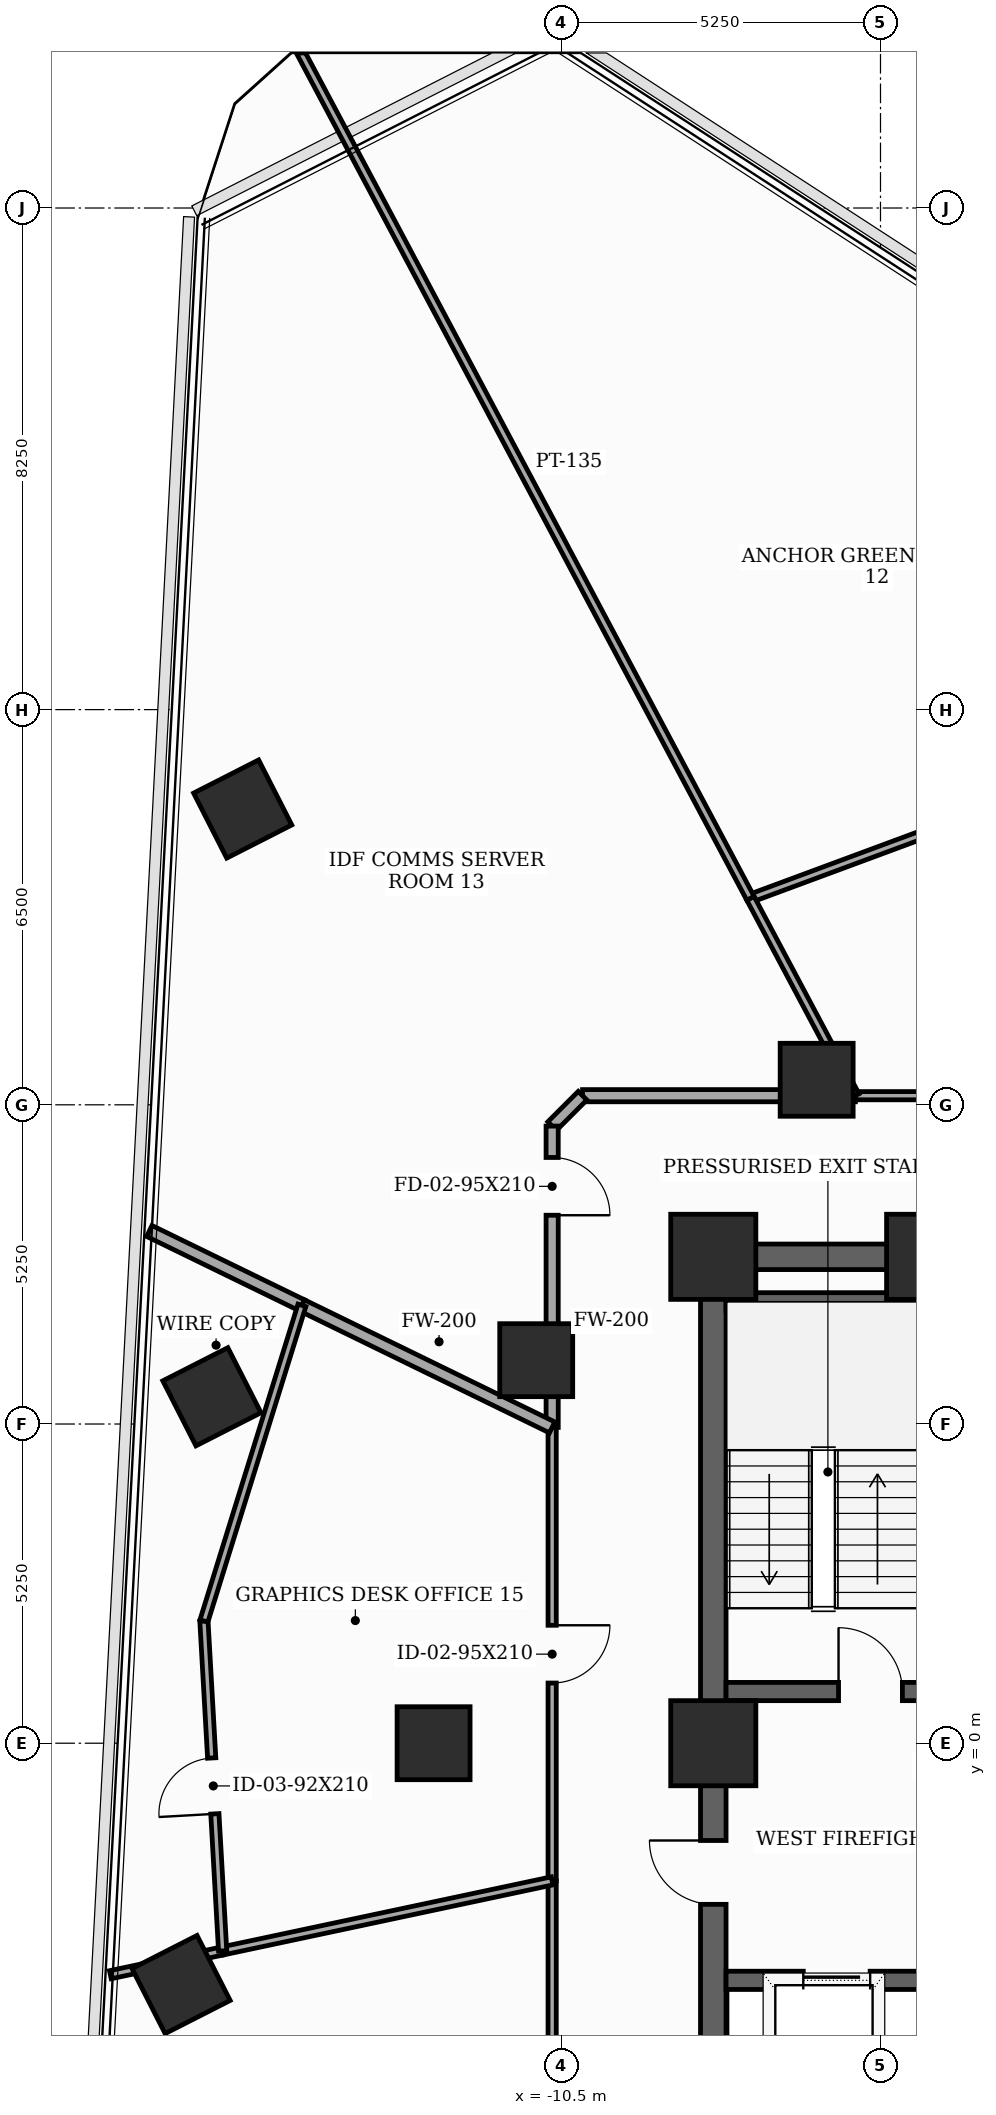
"""IFC4 building model, lengths in metres.
Left out: names, types, materials, properties, quantities, classifications, styles, units other than length and angle.
Written with IfcOpenShell. Run it as: python <this file> out.ifc"""

import sys

from ifc_helpers import new_model, si_unit, direction, frame, frame_2d, origin, origin_2d, place, context, subcontext, project, spatial, rectangle, extrude, element, fill, save


model = new_model("IFC4")
c1 = context("Model", 3, precision=1e-05, world=origin(), true_north=direction((0.0, 1.0)))
c2 = subcontext(c1, "Body", "Model", "MODEL_VIEW")
j1 = project(units=[si_unit("LENGTHUNIT", "METRE"), si_unit("PLANEANGLEUNIT", "RADIAN")], contexts=[c1])
p1 = place(None, origin())
s1 = spatial("IfcSite", under=j1, at=p1, CompositionType="ELEMENT")
p2 = place(p1, origin())
s2 = spatial("IfcBuilding", under=s1, at=p2, CompositionType="ELEMENT")
p3 = place(p2, frame((0.0, 0.0, 142.1)))
s3 = spatial("IfcBuildingStorey", under=s2, at=p3, CompositionType="ELEMENT", Elevation=142.1)
for number, where, z_axis, x_axis in (
    (1, (-4.45, 8.0, 0.0), (0.0, 0.0, 1.0), (1.0, 0.0, 0.0)),
    (2, (-8.0, 8.0, 0.0), (0.0, 0.0, 1.0), (1.0, 0.0, 0.0)),
    (3, (-8.0, 0.0, 0.0), (0.0, 0.0, 1.0), (1.0, 0.0, 0.0)),
):
    element("IfcColumn", number, at=place(p3, frame(where, z_axis=z_axis, x_axis=x_axis)), inside=s3, PredefinedType="COLUMN", context=c2, shape_type="SweptSolid", body=[
        extrude(rectangle(XDim=1.4, YDim=1.4, at=origin_2d()), origin(), (0.0, 0.0, 1.0), 3.7),
    ])
for number, where, z_axis, x_axis in (
    (4, (-6.3, 10.912, 0.0), (0.0, 0.0, 1.0), (1.0, 0.0, 0.0)),
    (5, (-10.912, 6.3, 0.0), (0.0, 0.0, 1.0), (1.0, 0.0, 0.0)),
    (6, (-12.6, 0.0, 0.0), (0.0, 0.0, 1.0), (1.0, 0.0, 0.0)),
    (7, (-15.739, 15.365, 0.0), (0.0, 0.0, 1.0), (0.891, 0.454, 0.0)),
    (8, (-16.246, 5.698, 0.0), (0.0, 0.0, 1.0), (0.891, 0.454, 0.0)),
    (9, (-16.752, -3.969, 0.0), (0.0, 0.0, 1.0), (0.891, 0.454, 0.0)),
):
    element("IfcColumn", number, at=place(p3, frame(where, z_axis=z_axis, x_axis=x_axis)), inside=s3, PredefinedType="COLUMN", context=c2, shape_type="SweptSolid", body=[
        extrude(rectangle(XDim=1.2, YDim=1.2, at=origin_2d()), origin(), (0.0, 0.0, 1.0), 3.7),
    ])
p4 = place(p3, frame((-8.0, -8.0, 0.0), z_axis=(0.0, 0.0, 1.0), x_axis=(0.0, 1.0, 0.0)))
e10 = element("IfcWall", 10, at=p4, inside=s3, PredefinedType="SHEAR", context=c2, shape_type="SweptSolid", body=[
    extrude(rectangle(XDim=16.0, YDim=0.42, at=frame_2d((8.0, 0.0))), origin(), (0.0, 0.0, 1.0), 3.5),
])
p5 = place(p4, frame((0.922, 0.0, 0.0)))
e11 = element("IfcOpeningElement", 11, at=p5, cuts=e10, PredefinedType="OPENING", context=c2, shape_type="SweptSolid", body=[
    extrude(rectangle(XDim=0.85, YDim=2.02, at=frame_2d((0.425, 1.01))), frame((0.0, 0.22, 0.0), z_axis=(0.0, -1.0, 0.0), x_axis=(1.0, 0.0, 0.0)), (0.0, 0.0, 1.0), 0.44),
])
p6 = place(p4, frame((5.35, 0.0, 0.0)))
e12 = element("IfcOpeningElement", 12, at=p6, cuts=e10, PredefinedType="OPENING", context=c2, shape_type="SweptSolid", body=[
    extrude(rectangle(XDim=1.05, YDim=2.15, at=frame_2d((0.525, 1.075))), frame((0.0, 0.22, 0.0), z_axis=(0.0, -1.0, 0.0), x_axis=(1.0, 0.0, 0.0)), (0.0, 0.0, 1.0), 0.44),
])
p7 = place(p3, frame((-8.0, 8.0, 0.0), z_axis=(0.0, 0.0, 1.0), x_axis=(1.0, 0.0, 0.0)))
e13 = element("IfcWall", 13, at=p7, inside=s3, PredefinedType="SHEAR", context=c2, shape_type="SweptSolid", body=[
    extrude(rectangle(XDim=16.0, YDim=0.42, at=frame_2d((8.0, 0.0))), origin(), (0.0, 0.0, 1.0), 3.5),
])
p8 = place(p7, frame((7.1, 0.0, 0.0)))
e14 = element("IfcOpeningElement", 14, at=p8, cuts=e13, PredefinedType="OPENING", context=c2, shape_type="SweptSolid", body=[
    extrude(rectangle(XDim=1.8, YDim=2.15, at=frame_2d((0.9, 1.075))), frame((0.0, 0.22, 0.0), z_axis=(0.0, -1.0, 0.0), x_axis=(1.0, 0.0, 0.0)), (0.0, 0.0, 1.0), 0.44),
])
p9 = place(p3, frame((-7.79, 0.85, 0.0), z_axis=(0.0, 0.0, 1.0), x_axis=(1.0, 0.0, 0.0)))
e15 = element("IfcWall", 15, at=p9, inside=s3, PredefinedType="SHEAR", context=c2, shape_type="SweptSolid", body=[
    extrude(rectangle(XDim=3.34, YDim=0.3, at=frame_2d((1.67, 0.0))), origin(), (0.0, 0.0, 1.0), 3.5),
])
p10 = place(p9, frame((1.85, 0.0, 0.0)))
e16 = element("IfcOpeningElement", 16, at=p10, cuts=e15, PredefinedType="OPENING", context=c2, shape_type="SweptSolid", body=[
    extrude(rectangle(XDim=1.05, YDim=2.15, at=frame_2d((0.525, 1.075))), frame((0.0, 0.16, 0.0), z_axis=(0.0, -1.0, 0.0), x_axis=(1.0, 0.0, 0.0)), (0.0, 0.0, 1.0), 0.32),
])
p11 = place(p3, frame((-7.79, 7.26, 0.0), z_axis=(0.0, 0.0, 1.0), x_axis=(1.0, 0.0, 0.0)))
e17 = element("IfcWall", 17, at=p11, inside=s3, PredefinedType="SHEAR", context=c2, shape_type="SweptSolid", body=[
    extrude(rectangle(XDim=3.34, YDim=0.3, at=frame_2d((1.67, 0.0))), origin(), (0.0, 0.0, 1.0), 3.5),
])
p12 = place(p3, frame((-7.79, -3.9, 0.0), z_axis=(0.0, 0.0, 1.0), x_axis=(1.0, 0.0, 0.0)))
e18 = element("IfcWall", 18, at=p12, inside=s3, PredefinedType="SHEAR", context=c2, shape_type="SweptSolid", body=[
    extrude(rectangle(XDim=3.34, YDim=0.3, at=frame_2d((1.67, 0.0))), origin(), (0.0, 0.0, 1.0), 3.5),
])
p13 = place(p12, frame((1.27, 0.0, 0.0)))
e19 = element("IfcOpeningElement", 19, at=p13, cuts=e18, PredefinedType="OPENING", context=c2, shape_type="SweptSolid", body=[
    extrude(rectangle(XDim=1.1, YDim=2.1, at=frame_2d((0.55, 1.05))), frame((0.0, 0.16, 0.0), z_axis=(0.0, -1.0, 0.0), x_axis=(1.0, 0.0, 0.0)), (0.0, 0.0, 1.0), 0.32),
])
p14 = place(p3, frame((-10.65, -2.264, 0.0), z_axis=(0.0, 0.0, 1.0), x_axis=(0.0, -1.0, 0.0)))
e20 = element("IfcWall", 20, at=p14, inside=s3, PredefinedType="PARTITIONING", context=c2, shape_type="SweptSolid", body=[
    extrude(rectangle(XDim=7.886, YDim=0.135, at=frame_2d((3.943, 0.0))), origin(), (0.0, 0.0, 1.0), 2.785),
])
p15 = place(p3, frame((4.742, 10.65, 0.0), z_axis=(0.0, 0.0, 1.0), x_axis=(-1.0, 0.0, 0.0)))
e21 = element("IfcWall", 21, at=p15, inside=s3, PredefinedType="PARTITIONING", context=c2, shape_type="SweptSolid", body=[
    extrude(rectangle(XDim=10.405, YDim=0.135, at=frame_2d((5.203, 0.0))), origin(), (0.0, 0.0, 1.0), 2.785),
])
p16 = place(p15, frame((5.976, 0.0, 0.0)))
e22 = element("IfcOpeningElement", 22, at=p16, cuts=e21, PredefinedType="OPENING", context=c2, shape_type="SweptSolid", body=[
    extrude(rectangle(XDim=0.95, YDim=2.1, at=frame_2d((0.475, 1.05))), frame((0.0, 0.077, 0.0), z_axis=(0.0, -1.0, 0.0), x_axis=(1.0, 0.0, 0.0)), (0.0, 0.0, 1.0), 0.155),
])
p17 = place(p3, frame((-5.663, 10.65, 0.0), z_axis=(0.0, 0.0, 1.0), x_axis=(-1.0, 0.0, 0.0)))
e23 = element("IfcWall", 23, at=p17, inside=s3, PredefinedType="SOLIDWALL", context=c2, shape_type="SweptSolid", body=[
    extrude(rectangle(XDim=4.487, YDim=0.2, at=frame_2d((2.243, 0.0))), origin(), (0.0, 0.0, 1.0), 2.785),
])
p18 = place(p3, frame((-10.15, 10.65, 0.0), z_axis=(0.0, 0.0, 1.0), x_axis=(-0.707106781187, -0.707106781187, 0.0)))
e24 = element("IfcWall", 24, at=p18, inside=s3, PredefinedType="SOLIDWALL", context=c2, shape_type="SweptSolid", body=[
    extrude(rectangle(XDim=0.707, YDim=0.2, at=frame_2d((0.354, 0.0))), origin(), (0.0, 0.0, 1.0), 3.5),
])
p19 = place(p3, frame((-10.65, 10.15, 0.0), z_axis=(0.0, 0.0, 1.0), x_axis=(0.0, -1.0, 0.0)))
e25 = element("IfcWall", 25, at=p19, inside=s3, PredefinedType="SOLIDWALL", context=c2, shape_type="SweptSolid", body=[
    extrude(rectangle(XDim=4.956, YDim=0.2, at=frame_2d((2.478, 0.0))), origin(), (0.0, 0.0, 1.0), 2.785),
])
p20 = place(p19, frame((0.516, 0.0, 0.0)))
e26 = element("IfcOpeningElement", 26, at=p20, cuts=e25, PredefinedType="OPENING", context=c2, shape_type="SweptSolid", body=[
    extrude(rectangle(XDim=0.95, YDim=2.1, at=frame_2d((0.475, 1.05))), frame((0.0, 0.11, 0.0), z_axis=(0.0, -1.0, 0.0), x_axis=(1.0, 0.0, 0.0)), (0.0, 0.0, 1.0), 0.22),
])
p21 = place(p3, frame((-10.65, 5.194, 0.0), z_axis=(0.0, 0.0, 1.0), x_axis=(0.0, -1.0, 0.0)))
e27 = element("IfcWall", 27, at=p21, inside=s3, PredefinedType="PARTITIONING", context=c2, shape_type="SweptSolid", body=[
    extrude(rectangle(XDim=7.458, YDim=0.135, at=frame_2d((3.729, 0.0))), origin(), (0.0, 0.0, 1.0), 2.785),
])
p22 = place(p21, frame((3.254, 0.0, 0.0)))
e28 = element("IfcOpeningElement", 28, at=p22, cuts=e27, PredefinedType="OPENING", context=c2, shape_type="SweptSolid", body=[
    extrude(rectangle(XDim=0.95, YDim=2.1, at=frame_2d((0.475, 1.05))), frame((0.0, 0.077, 0.0), z_axis=(0.0, -1.0, 0.0), x_axis=(1.0, 0.0, 0.0)), (0.0, 0.0, 1.0), 0.155),
])
p23 = place(p3, frame((-16.069, -3.416, 0.0), z_axis=(0.0, 0.0, 1.0), x_axis=(-0.978246851629, -0.207444202805, 0.0)))
e29 = element("IfcWall", 29, at=p23, inside=s3, PredefinedType="PARTITIONING", context=c2, shape_type="SweptSolid", body=[
    extrude(rectangle(XDim=1.888, YDim=0.135, at=frame_2d((0.944, 0.0))), origin(), (0.0, 0.0, 1.0), 2.885),
])
p24 = place(p3, frame((-10.65, -2.264, 0.0), z_axis=(0.0, 0.0, 1.0), x_axis=(-0.978139695811, -0.207948877079, 0.0)))
e30 = element("IfcWall", 30, at=p24, inside=s3, PredefinedType="PARTITIONING", context=c2, shape_type="SweptSolid", body=[
    extrude(rectangle(XDim=5.54, YDim=0.135, at=frame_2d((2.77, 0.0))), origin(), (0.0, 0.0, 1.0), 2.785),
])
p25 = place(p3, frame((-3.06, 15.501, 0.0), z_axis=(0.0, 0.0, 1.0), x_axis=(-0.937697715957, -0.347452145611, 0.0)))
e31 = element("IfcWall", 31, at=p25, inside=s3, PredefinedType="PARTITIONING", context=c2, shape_type="SweptSolid", body=[
    extrude(rectangle(XDim=4.616, YDim=0.135, at=frame_2d((2.308, 0.0))), origin(), (0.0, 0.0, 1.0), 3.5),
])
p26 = place(p3, frame((-7.389, 13.897, 0.0), z_axis=(0.0, 0.0, 1.0), x_axis=(0.469329971657, -0.883022863636, 0.0)))
e32 = element("IfcWall", 32, at=p26, inside=s3, PredefinedType="PARTITIONING", context=c2, shape_type="SweptSolid", body=[
    extrude(rectangle(XDim=3.677, YDim=0.135, at=frame_2d((1.839, 0.0))), origin(), (0.0, 0.0, 1.0), 2.785),
])
p27 = place(p3, frame((-14.797, 27.829, 0.0), z_axis=(0.0, 0.0, 1.0), x_axis=(0.469495702595, -0.882934757072, 0.0)))
e33 = element("IfcWall", 33, at=p27, inside=s3, PredefinedType="PARTITIONING", context=c2, shape_type="SweptSolid", body=[
    extrude(rectangle(XDim=15.779, YDim=0.135, at=frame_2d((7.89, 0.0))), origin(), (0.0, 0.0, 1.0), 2.985),
])
p28 = place(p3, frame((-17.275, 8.425, 0.0), z_axis=(0.0, 0.0, 1.0), x_axis=(0.898962499014, -0.438025598985, 0.0)))
e34 = element("IfcWall", 34, at=p28, inside=s3, PredefinedType="SOLIDWALL", context=c2, shape_type="SweptSolid", body=[
    extrude(rectangle(XDim=2.792, YDim=0.2, at=frame_2d((1.396, 0.0))), origin(), (0.0, 0.0, 1.0), 2.985),
])
p29 = place(p3, frame((-14.765, 7.202, 0.0), z_axis=(0.0, 0.0, 1.0), x_axis=(0.898725395048, -0.438511874748, 0.0)))
e35 = element("IfcWall", 35, at=p29, inside=s3, PredefinedType="SOLIDWALL", context=c2, shape_type="SweptSolid", body=[
    extrude(rectangle(XDim=4.579, YDim=0.2, at=frame_2d((2.289, 0.0))), origin(), (0.0, 0.0, 1.0), 2.785),
])
p30 = place(p3, frame((-16.069, -3.416, 0.0), z_axis=(0.0, 0.0, 1.0), x_axis=(-0.056636641993, 0.99839485715, 0.0)))
e36 = element("IfcWall", 36, at=p30, inside=s3, PredefinedType="PARTITIONING", context=c2, shape_type="SweptSolid", body=[
    extrude(rectangle(XDim=5.436, YDim=0.135, at=frame_2d((2.718, 0.0))), origin(), (0.0, 0.0, 1.0), 2.885),
])
p31 = place(p30, frame((2.258, 0.0, 0.0)))
e37 = element("IfcOpeningElement", 37, at=p31, cuts=e36, PredefinedType="OPENING", context=c2, shape_type="SweptSolid", body=[
    extrude(rectangle(XDim=0.92, YDim=2.1, at=frame_2d((0.46, 1.05))), frame((0.0, 0.077, 0.0), z_axis=(0.0, -1.0, 0.0), x_axis=(1.0, 0.0, 0.0)), (0.0, 0.0, 1.0), 0.155),
])
p32 = place(p3, frame((-16.377, 2.011, 0.0), z_axis=(0.0, 0.0, 1.0), x_axis=(0.296581456096, 0.955007560127, 0.0)))
e38 = element("IfcWall", 38, at=p32, inside=s3, PredefinedType="PARTITIONING", context=c2, shape_type="SweptSolid", body=[
    extrude(rectangle(XDim=5.436, YDim=0.135, at=frame_2d((2.718, 0.0))), origin(), (0.0, 0.0, 1.0), 2.885),
])
p33 = place(p6, origin())
e39 = element("IfcDoor", 39, at=p33, inside=s3, OperationType="SINGLE_SWING_RIGHT", PredefinedType="DOOR", context=c2, shape_type="SweptSolid", body=[
    extrude(rectangle(XDim=1.05, YDim=2.15, at=frame_2d((0.525, 1.075))), frame((0.0, 0.025, 0.0), z_axis=(0.0, -1.0, 0.0), x_axis=(1.0, 0.0, 0.0)), (0.0, 0.0, 1.0), 0.05),
])
fill(e12, e39)
p34 = place(p10, origin())
e40 = element("IfcDoor", 40, at=p34, inside=s3, OperationType="SINGLE_SWING_LEFT", PredefinedType="DOOR", context=c2, shape_type="SweptSolid", body=[
    extrude(rectangle(XDim=1.05, YDim=2.15, at=frame_2d((0.525, 1.075))), frame((0.0, 0.025, 0.0), z_axis=(0.0, -1.0, 0.0), x_axis=(1.0, 0.0, 0.0)), (0.0, 0.0, 1.0), 0.05),
])
fill(e16, e40)
p35 = place(p13, origin())
e41 = element("IfcDoor", 41, at=p35, inside=s3, OperationType="SLIDING_TO_LEFT", PredefinedType="DOOR", context=c2, shape_type="SweptSolid", body=[
    extrude(rectangle(XDim=1.1, YDim=2.1, at=frame_2d((0.55, 1.05))), frame((0.0, 0.025, 0.0), z_axis=(0.0, -1.0, 0.0), x_axis=(1.0, 0.0, 0.0)), (0.0, 0.0, 1.0), 0.05),
])
fill(e19, e41)
p36 = place(p20, origin())
e42 = element("IfcDoor", 42, at=p36, inside=s3, OperationType="SINGLE_SWING_RIGHT", PredefinedType="DOOR", context=c2, shape_type="SweptSolid", body=[
    extrude(rectangle(XDim=0.95, YDim=2.1, at=frame_2d((0.475, 1.05))), frame((0.0, 0.025, 0.0), z_axis=(0.0, -1.0, 0.0), x_axis=(1.0, 0.0, 0.0)), (0.0, 0.0, 1.0), 0.05),
])
fill(e26, e42)
p37 = place(p22, origin())
e43 = element("IfcDoor", 43, at=p37, inside=s3, OperationType="SINGLE_SWING_LEFT", PredefinedType="DOOR", context=c2, shape_type="SweptSolid", body=[
    extrude(rectangle(XDim=0.95, YDim=2.1, at=frame_2d((0.475, 1.05))), frame((0.0, 0.025, 0.0), z_axis=(0.0, -1.0, 0.0), x_axis=(1.0, 0.0, 0.0)), (0.0, 0.0, 1.0), 0.05),
])
fill(e28, e43)
p38 = place(p31, origin())
e44 = element("IfcDoor", 44, at=p38, inside=s3, OperationType="SINGLE_SWING_LEFT", PredefinedType="DOOR", context=c2, shape_type="SweptSolid", body=[
    extrude(rectangle(XDim=0.92, YDim=2.1, at=frame_2d((0.46, 1.05))), frame((0.0, 0.025, 0.0), z_axis=(0.0, -1.0, 0.0), x_axis=(1.0, 0.0, 0.0)), (0.0, 0.0, 1.0), 0.05),
])
fill(e37, e44)
save(model, sys.argv[1])
